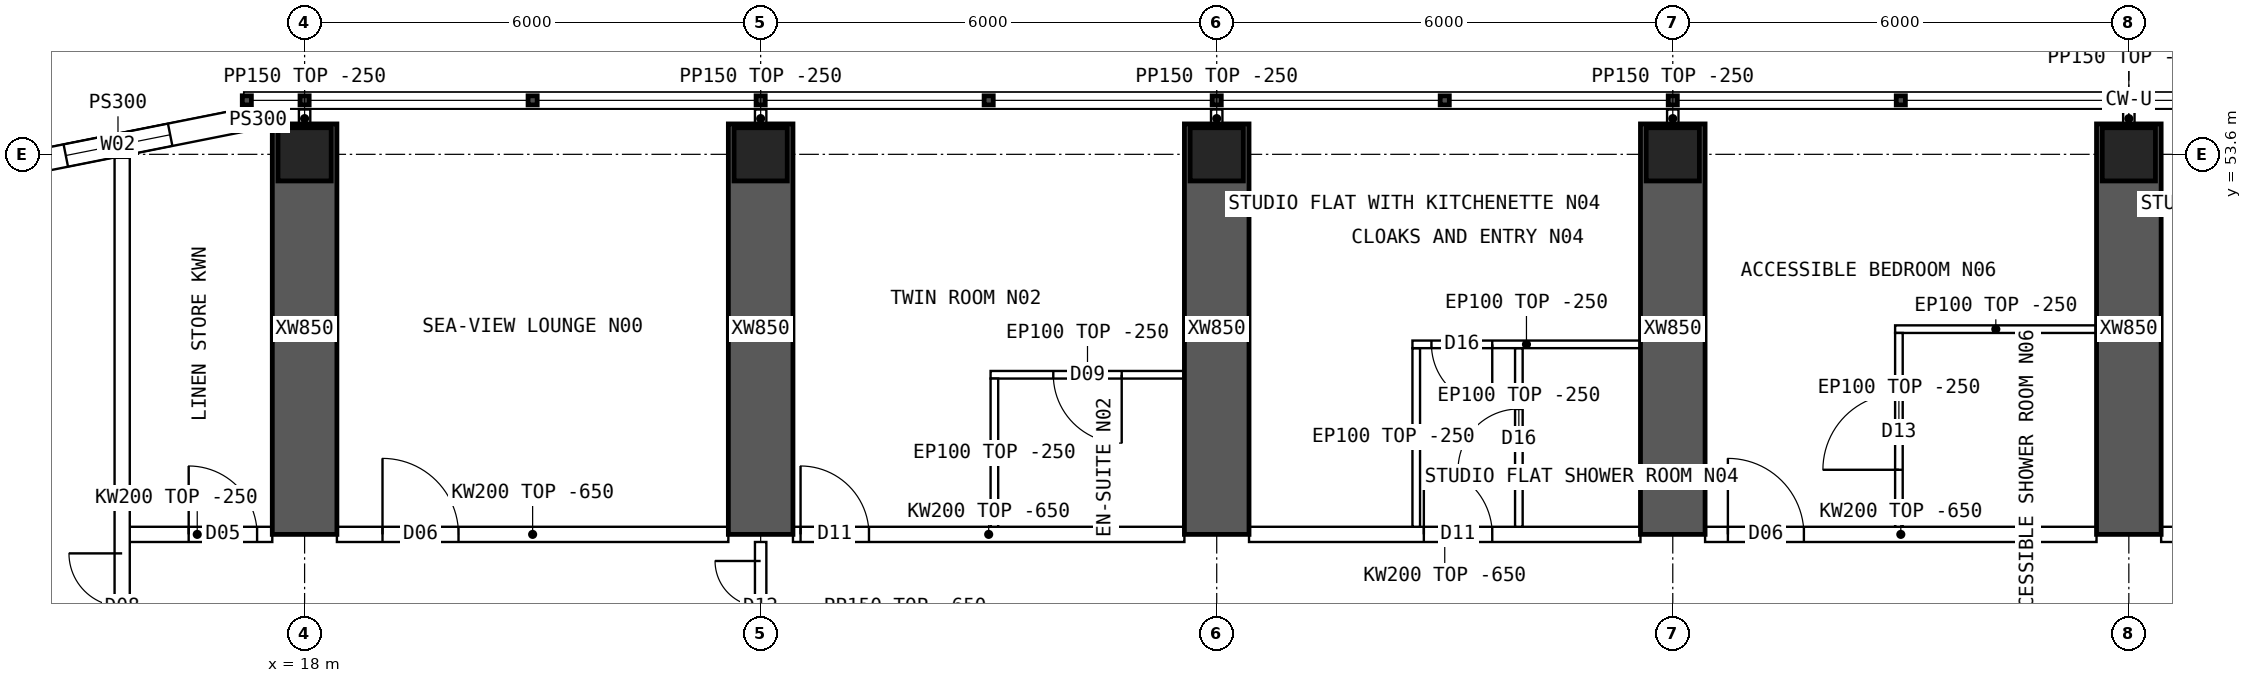
"""IFC4 building model, lengths in metres.
Left out: names, types, materials, properties, quantities, classifications, styles, units other than length and angle.
Written with IfcOpenShell. Run it as: python <this file> out.ifc"""

import sys

from ifc_helpers import new_model, si_unit, direction, frame, frame_2d, origin, origin_2d, place, context, subcontext, project, spatial, polyline, rectangle, hollow_rectangle, outline, extrude, element, fill, save


model = new_model("IFC4")
c1 = context("Model", 3, precision=1e-05, world=origin(), true_north=direction((0.0, 1.0)))
c2 = subcontext(c1, "Body", "Model", "MODEL_VIEW")
j1 = project(units=[si_unit("LENGTHUNIT", "METRE"), si_unit("PLANEANGLEUNIT", "RADIAN")], contexts=[c1])
p1 = place(None, origin())
s1 = spatial("IfcSite", under=j1, at=p1, CompositionType="ELEMENT")
p2 = place(p1, origin())
s2 = spatial("IfcBuilding", under=s1, at=p2, CompositionType="ELEMENT")
p3 = place(p2, frame((0.0, 0.0, 156.1)))
s3 = spatial("IfcBuildingStorey", under=s2, at=p3, CompositionType="ELEMENT", Elevation=156.1)
for number, where, z_axis, x_axis in (
    (1, (18.0, 53.6, 0.0), (0.0, 0.0, 1.0), (1.0, 0.0, 0.0)),
    (2, (24.0, 53.6, 0.0), (0.0, 0.0, 1.0), (1.0, 0.0, 0.0)),
    (3, (30.0, 53.6, 0.0), (0.0, 0.0, 1.0), (1.0, 0.0, 0.0)),
    (4, (36.0, 53.6, 0.0), (0.0, 0.0, 1.0), (1.0, 0.0, 0.0)),
    (5, (42.0, 53.6, 0.0), (0.0, 0.0, 1.0), (1.0, 0.0, 0.0)),
):
    element("IfcColumn", number, at=place(p3, frame(where, z_axis=z_axis, x_axis=x_axis)), inside=s3, PredefinedType="COLUMN", context=c2, shape_type="SweptSolid", body=[
        extrude(hollow_rectangle(XDim=0.7, YDim=0.7, WallThickness=0.07, at=origin_2d()), origin(), (0.0, 0.0, 1.0), 3.75),
    ])
for number, where, z_axis, x_axis in (
    (6, (18.0, 48.6, 0.0), (0.0, 0.0, 1.0), (0.0, 1.0, 0.0)),
    (7, (24.0, 48.6, 0.0), (0.0, 0.0, 1.0), (0.0, 1.0, 0.0)),
    (8, (30.0, 48.6, 0.0), (0.0, 0.0, 1.0), (0.0, 1.0, 0.0)),
    (9, (36.0, 48.6, 0.0), (0.0, 0.0, 1.0), (0.0, 1.0, 0.0)),
    (10, (42.0, 48.6, 0.0), (0.0, 0.0, 1.0), (0.0, 1.0, 0.0)),
):
    element("IfcWall", number, at=place(p3, frame(where, z_axis=z_axis, x_axis=x_axis)), inside=s3, PredefinedType="SHEAR", context=c2, shape_type="SweptSolid", body=[
        extrude(rectangle(XDim=5.4, YDim=0.85, at=frame_2d((2.7, 0.0))), origin(), (0.0, 0.0, 1.0), 3.75),
    ])
p4 = place(p3, frame((17.2, 54.05, 0.0), z_axis=(0.0, 0.0, 1.0), x_axis=(-0.98078325777, -0.195100490205, 0.0)))
e11 = element("IfcWall", 11, at=p4, inside=s3, PredefinedType="SOLIDWALL", context=c2, shape_type="SweptSolid", body=[
    extrude(outline(polyline([(-0.03, -0.15), (3.405, -0.15), (3.345, 0.15), (0.03, 0.15), (-0.03, -0.15)])), origin(), (0.0, 0.0, 1.0), 3.5),
])
p5 = place(p4, frame((0.988, 0.0, 0.9)))
e12 = element("IfcOpeningElement", 12, at=p5, cuts=e11, PredefinedType="OPENING", context=c2, shape_type="SweptSolid", body=[
    extrude(rectangle(XDim=1.4, YDim=1.8, at=frame_2d((0.7, 0.9))), frame((0.0, 0.16, 0.0), z_axis=(0.0, -1.0, 0.0), x_axis=(1.0, 0.0, 0.0)), (0.0, 0.0, 1.0), 0.32),
])
p6 = place(p3, frame((17.2, 54.05, 0.0), z_axis=(0.0, 0.0, 1.0), x_axis=(1.0, 0.0, 0.0)))
e13 = element("IfcWall", 13, at=p6, inside=s3, PredefinedType="SOLIDWALL", context=c2, shape_type="SweptSolid", body=[
    extrude(rectangle(XDim=0.375, YDim=0.3, at=frame_2d((0.188, 0.0))), origin(), (0.0, 0.0, 1.0), 3.5),
])
p7 = place(p3, frame((15.6, 48.6, 0.0), z_axis=(0.0, 0.0, 1.0), x_axis=(1.0, 0.0, 0.0)))
e14 = element("IfcWall", 14, at=p7, inside=s3, PredefinedType="SOLIDWALL", context=c2, shape_type="SweptSolid", body=[
    extrude(rectangle(XDim=1.975, YDim=0.2, at=frame_2d((0.987, 0.0))), origin(), (0.0, 0.0, 1.0), 3.5),
])
p8 = place(p7, frame((0.875, 0.0, 0.0)))
e15 = element("IfcOpeningElement", 15, at=p8, cuts=e14, PredefinedType="OPENING", context=c2, shape_type="SweptSolid", body=[
    extrude(rectangle(XDim=0.9, YDim=2.1, at=frame_2d((0.45, 1.05))), frame((0.0, 0.11, 0.0), z_axis=(0.0, -1.0, 0.0), x_axis=(1.0, 0.0, 0.0)), (0.0, 0.0, 1.0), 0.22),
])
p9 = place(p3, frame((18.425, 48.6, 0.0), z_axis=(0.0, 0.0, 1.0), x_axis=(1.0, 0.0, 0.0)))
e16 = element("IfcWall", 16, at=p9, inside=s3, PredefinedType="SOLIDWALL", context=c2, shape_type="SweptSolid", body=[
    extrude(outline(polyline([(0.0, 0.0), (5.15, 0.0), (5.15, 3.1), (0.0, 3.1), (0.0, 0.0)])), frame((0.0, 0.1, 0.0), z_axis=(0.0, -1.0, 0.0), x_axis=(1.0, 0.0, 0.0)), (0.0, 0.0, 1.0), 0.2),
])
p10 = place(p9, frame((0.6, 0.0, 0.0)))
e17 = element("IfcOpeningElement", 17, at=p10, cuts=e16, PredefinedType="OPENING", context=c2, shape_type="SweptSolid", body=[
    extrude(rectangle(XDim=1.0, YDim=2.1, at=frame_2d((0.5, 1.05))), frame((0.0, 0.11, 0.0), z_axis=(0.0, -1.0, 0.0), x_axis=(1.0, 0.0, 0.0)), (0.0, 0.0, 1.0), 0.22),
])
p11 = place(p3, frame((24.425, 48.6, 0.0), z_axis=(0.0, 0.0, 1.0), x_axis=(1.0, 0.0, 0.0)))
e18 = element("IfcWall", 18, at=p11, inside=s3, PredefinedType="SOLIDWALL", context=c2, shape_type="SweptSolid", body=[
    extrude(outline(polyline([(0.0, 0.0), (5.15, 0.0), (5.15, 3.1), (0.0, 3.1), (0.0, 0.0)])), frame((0.0, 0.1, 0.0), z_axis=(0.0, -1.0, 0.0), x_axis=(1.0, 0.0, 0.0)), (0.0, 0.0, 1.0), 0.2),
])
p12 = place(p11, frame((0.1, 0.0, 0.0)))
e19 = element("IfcOpeningElement", 19, at=p12, cuts=e18, PredefinedType="OPENING", context=c2, shape_type="SweptSolid", body=[
    extrude(rectangle(XDim=0.9, YDim=2.1, at=frame_2d((0.45, 1.05))), frame((0.0, 0.11, 0.0), z_axis=(0.0, -1.0, 0.0), x_axis=(1.0, 0.0, 0.0)), (0.0, 0.0, 1.0), 0.22),
])
p13 = place(p3, frame((30.425, 48.6, 0.0), z_axis=(0.0, 0.0, 1.0), x_axis=(1.0, 0.0, 0.0)))
e20 = element("IfcWall", 20, at=p13, inside=s3, PredefinedType="SOLIDWALL", context=c2, shape_type="SweptSolid", body=[
    extrude(outline(polyline([(0.0, 0.0), (5.15, 0.0), (5.15, 3.1), (0.0, 3.1), (0.0, 0.0)])), frame((0.0, 0.1, 0.0), z_axis=(0.0, -1.0, 0.0), x_axis=(1.0, 0.0, 0.0)), (0.0, 0.0, 1.0), 0.2),
])
p14 = place(p13, frame((2.3, 0.0, 0.0)))
e21 = element("IfcOpeningElement", 21, at=p14, cuts=e20, PredefinedType="OPENING", context=c2, shape_type="SweptSolid", body=[
    extrude(rectangle(XDim=0.9, YDim=2.1, at=frame_2d((0.45, 1.05))), frame((0.0, 0.11, 0.0), z_axis=(0.0, -1.0, 0.0), x_axis=(1.0, 0.0, 0.0)), (0.0, 0.0, 1.0), 0.22),
])
p15 = place(p3, frame((36.425, 48.6, 0.0), z_axis=(0.0, 0.0, 1.0), x_axis=(1.0, 0.0, 0.0)))
e22 = element("IfcWall", 22, at=p15, inside=s3, PredefinedType="SOLIDWALL", context=c2, shape_type="SweptSolid", body=[
    extrude(outline(polyline([(0.0, 0.0), (5.15, 0.0), (5.15, 3.1), (0.0, 3.1), (0.0, 0.0)])), frame((0.0, 0.1, 0.0), z_axis=(0.0, -1.0, 0.0), x_axis=(1.0, 0.0, 0.0)), (0.0, 0.0, 1.0), 0.2),
])
p16 = place(p15, frame((0.3, 0.0, 0.0)))
e23 = element("IfcOpeningElement", 23, at=p16, cuts=e22, PredefinedType="OPENING", context=c2, shape_type="SweptSolid", body=[
    extrude(rectangle(XDim=1.0, YDim=2.1, at=frame_2d((0.5, 1.05))), frame((0.0, 0.11, 0.0), z_axis=(0.0, -1.0, 0.0), x_axis=(1.0, 0.0, 0.0)), (0.0, 0.0, 1.0), 0.22),
])
p17 = place(p3, frame((42.425, 48.6, 0.0), z_axis=(0.0, 0.0, 1.0), x_axis=(1.0, 0.0, 0.0)))
e24 = element("IfcWall", 24, at=p17, inside=s3, PredefinedType="SOLIDWALL", context=c2, shape_type="SweptSolid", body=[
    extrude(outline(polyline([(0.0, 0.0), (5.15, 0.0), (5.15, 3.1), (0.0, 3.1), (0.0, 0.0)])), frame((0.0, 0.1, 0.0), z_axis=(0.0, -1.0, 0.0), x_axis=(1.0, 0.0, 0.0)), (0.0, 0.0, 1.0), 0.2),
])
p18 = place(p17, frame((2.3, 0.0, 0.0)))
e25 = element("IfcOpeningElement", 25, at=p18, cuts=e24, PredefinedType="OPENING", context=c2, shape_type="SweptSolid", body=[
    extrude(rectangle(XDim=0.9, YDim=2.1, at=frame_2d((0.45, 1.05))), frame((0.0, 0.11, 0.0), z_axis=(0.0, -1.0, 0.0), x_axis=(1.0, 0.0, 0.0)), (0.0, 0.0, 1.0), 0.22),
])
p19 = place(p3, frame((27.025, 50.7, 0.0), z_axis=(0.0, 0.0, 1.0), x_axis=(1.0, 0.0, 0.0)))
e26 = element("IfcWall", 26, at=p19, inside=s3, PredefinedType="PARTITIONING", context=c2, shape_type="SweptSolid", body=[
    extrude(rectangle(XDim=2.55, YDim=0.1, at=frame_2d((1.275, 0.0))), origin(), (0.0, 0.0, 1.0), 3.5),
])
p20 = place(p19, frame((0.825, 0.0, 0.0)))
e27 = element("IfcOpeningElement", 27, at=p20, cuts=e26, PredefinedType="OPENING", context=c2, shape_type="SweptSolid", body=[
    extrude(rectangle(XDim=0.9, YDim=2.1, at=frame_2d((0.45, 1.05))), frame((0.0, 0.06, 0.0), z_axis=(0.0, -1.0, 0.0), x_axis=(1.0, 0.0, 0.0)), (0.0, 0.0, 1.0), 0.12),
])
p21 = place(p3, frame((27.075, 50.65, 0.0), z_axis=(0.0, 0.0, 1.0), x_axis=(0.0, -1.0, 0.0)))
e28 = element("IfcWall", 28, at=p21, inside=s3, PredefinedType="PARTITIONING", context=c2, shape_type="SweptSolid", body=[
    extrude(outline(polyline([(0.0, 0.0), (1.95, 0.0), (1.95, 3.1), (1.902, 3.1), (1.9, 3.5), (0.0, 3.5), (0.0, 0.0)])), frame((0.0, 0.05, 0.0), z_axis=(0.0, -1.0, 0.0), x_axis=(1.0, 0.0, 0.0)), (0.0, 0.0, 1.0), 0.1),
])
p22 = place(p3, frame((32.575, 51.1, 0.0), z_axis=(0.0, 0.0, 1.0), x_axis=(1.0, 0.0, 0.0)))
e29 = element("IfcWall", 29, at=p22, inside=s3, PredefinedType="PARTITIONING", context=c2, shape_type="SweptSolid", body=[
    extrude(rectangle(XDim=3.0, YDim=0.1, at=frame_2d((1.5, 0.0))), origin(), (0.0, 0.0, 1.0), 3.5),
])
p23 = place(p22, frame((0.25, 0.0, 0.0)))
e30 = element("IfcOpeningElement", 30, at=p23, cuts=e29, PredefinedType="OPENING", context=c2, shape_type="SweptSolid", body=[
    extrude(rectangle(XDim=0.8, YDim=2.1, at=frame_2d((0.4, 1.05))), frame((0.0, 0.06, 0.0), z_axis=(0.0, -1.0, 0.0), x_axis=(1.0, 0.0, 0.0)), (0.0, 0.0, 1.0), 0.12),
])
p24 = place(p3, frame((32.625, 51.05, 0.0), z_axis=(0.0, 0.0, 1.0), x_axis=(0.0, -1.0, 0.0)))
e31 = element("IfcWall", 31, at=p24, inside=s3, PredefinedType="PARTITIONING", context=c2, shape_type="SweptSolid", body=[
    extrude(outline(polyline([(0.0, 0.0), (2.35, 0.0), (2.35, 3.1), (2.302, 3.1), (2.3, 3.5), (0.0, 3.5), (0.0, 0.0)])), frame((0.0, 0.05, 0.0), z_axis=(0.0, -1.0, 0.0), x_axis=(1.0, 0.0, 0.0)), (0.0, 0.0, 1.0), 0.1),
])
p25 = place(p3, frame((33.975, 51.05, 0.0), z_axis=(0.0, 0.0, 1.0), x_axis=(0.0, -1.0, 0.0)))
e32 = element("IfcWall", 32, at=p25, inside=s3, PredefinedType="PARTITIONING", context=c2, shape_type="SweptSolid", body=[
    extrude(outline(polyline([(0.0, 0.0), (2.35, 0.0), (2.35, 3.1), (2.302, 3.1), (2.3, 3.5), (0.0, 3.5), (0.0, 0.0)])), frame((0.0, 0.05, 0.0), z_axis=(0.0, -1.0, 0.0), x_axis=(1.0, 0.0, 0.0)), (0.0, 0.0, 1.0), 0.1),
])
p26 = place(p25, frame((0.8, 0.0, 0.0)))
e33 = element("IfcOpeningElement", 33, at=p26, cuts=e32, PredefinedType="OPENING", context=c2, shape_type="SweptSolid", body=[
    extrude(rectangle(XDim=0.8, YDim=2.1, at=frame_2d((0.4, 1.05))), frame((0.0, 0.06, 0.0), z_axis=(0.0, -1.0, 0.0), x_axis=(1.0, 0.0, 0.0)), (0.0, 0.0, 1.0), 0.12),
])
p27 = place(p3, frame((38.925, 51.3, 0.0), z_axis=(0.0, 0.0, 1.0), x_axis=(1.0, 0.0, 0.0)))
e34 = element("IfcWall", 34, at=p27, inside=s3, PredefinedType="PARTITIONING", context=c2, shape_type="SweptSolid", body=[
    extrude(rectangle(XDim=2.65, YDim=0.1, at=frame_2d((1.325, 0.0))), origin(), (0.0, 0.0, 1.0), 3.5),
])
p28 = place(p3, frame((38.975, 51.25, 0.0), z_axis=(0.0, 0.0, 1.0), x_axis=(0.0, -1.0, 0.0)))
e35 = element("IfcWall", 35, at=p28, inside=s3, PredefinedType="PARTITIONING", context=c2, shape_type="SweptSolid", body=[
    extrude(outline(polyline([(0.0, 0.0), (2.55, 0.0), (2.55, 3.1), (2.502, 3.1), (2.5, 3.5), (0.0, 3.5), (0.0, 0.0)])), frame((0.0, 0.05, 0.0), z_axis=(0.0, -1.0, 0.0), x_axis=(1.0, 0.0, 0.0)), (0.0, 0.0, 1.0), 0.1),
])
p29 = place(p28, frame((0.8, 0.0, 0.0)))
e36 = element("IfcOpeningElement", 36, at=p29, cuts=e35, PredefinedType="OPENING", context=c2, shape_type="SweptSolid", body=[
    extrude(rectangle(XDim=1.0, YDim=2.1, at=frame_2d((0.5, 1.05))), frame((0.0, 0.06, 0.0), z_axis=(0.0, -1.0, 0.0), x_axis=(1.0, 0.0, 0.0)), (0.0, 0.0, 1.0), 0.12),
])
p30 = place(p3, frame((24.0, 46.8, 0.0), z_axis=(0.0, 0.0, 1.0), x_axis=(0.0, 1.0, 0.0)))
e37 = element("IfcWall", 37, at=p30, inside=s3, PredefinedType="PARTITIONING", context=c2, shape_type="SweptSolid", body=[
    extrude(outline(polyline([(0.0, 0.0), (1.7, 0.0), (1.7, 3.1), (0.0, 3.1), (0.0, 0.0)])), frame((0.0, 0.075, 0.0), z_axis=(0.0, -1.0, 0.0), x_axis=(1.0, 0.0, 0.0)), (0.0, 0.0, 1.0), 0.15),
])
p31 = place(p30, frame((0.25, 0.0, 0.0)))
e38 = element("IfcOpeningElement", 38, at=p31, cuts=e37, PredefinedType="OPENING", context=c2, shape_type="SweptSolid", body=[
    extrude(rectangle(XDim=1.2, YDim=2.1, at=frame_2d((0.6, 1.05))), frame((0.0, 0.085, 0.0), z_axis=(0.0, -1.0, 0.0), x_axis=(1.0, 0.0, 0.0)), (0.0, 0.0, 1.0), 0.17),
])
p32 = place(p3, frame((15.6, 10.446, 0.0), z_axis=(0.0, 0.0, 1.0), x_axis=(0.0, 1.0, 0.0)))
e39 = element("IfcWall", 39, at=p32, inside=s3, PredefinedType="SOLIDWALL", context=c2, shape_type="SweptSolid", body=[
    extrude(rectangle(XDim=43.107, YDim=0.2, at=frame_2d((21.554, 0.0))), origin(), (0.0, 0.0, 1.0), 3.5),
])
p33 = place(p32, frame((13.914, 0.0, 0.0)))
e40 = element("IfcOpeningElement", 40, at=p33, cuts=e39, PredefinedType="OPENING", context=c2, shape_type="SweptSolid", body=[
    extrude(rectangle(XDim=1.2, YDim=2.1, at=frame_2d((0.6, 1.05))), frame((0.0, 0.11, 0.0), z_axis=(0.0, -1.0, 0.0), x_axis=(1.0, 0.0, 0.0)), (0.0, 0.0, 1.0), 0.22),
])
p34 = place(p32, frame((27.994, 0.0, 0.0)))
e41 = element("IfcOpeningElement", 41, at=p34, cuts=e39, PredefinedType="OPENING", context=c2, shape_type="SweptSolid", body=[
    extrude(rectangle(XDim=1.2, YDim=2.1, at=frame_2d((0.6, 1.05))), frame((0.0, 0.11, 0.0), z_axis=(0.0, -1.0, 0.0), x_axis=(1.0, 0.0, 0.0)), (0.0, 0.0, 1.0), 0.22),
])
p35 = place(p32, frame((5.104, 0.0, 0.0)))
e42 = element("IfcOpeningElement", 42, at=p35, cuts=e39, PredefinedType="OPENING", context=c2, shape_type="SweptSolid", body=[
    extrude(rectangle(XDim=1.4, YDim=2.1, at=frame_2d((0.7, 1.05))), frame((0.0, 0.11, 0.0), z_axis=(0.0, -1.0, 0.0), x_axis=(1.0, 0.0, 0.0)), (0.0, 0.0, 1.0), 0.22),
])
p36 = place(p32, frame((36.504, 0.0, 0.0)))
e43 = element("IfcOpeningElement", 43, at=p36, cuts=e39, PredefinedType="OPENING", context=c2, shape_type="SweptSolid", body=[
    extrude(rectangle(XDim=1.4, YDim=2.1, at=frame_2d((0.7, 1.05))), frame((0.0, 0.11, 0.0), z_axis=(0.0, -1.0, 0.0), x_axis=(1.0, 0.0, 0.0)), (0.0, 0.0, 1.0), 0.22),
])
for number, where, z_axis, x_axis in (
    (44, (18.0, 53.95, 0.0), (0.0, 0.0, 1.0), (0.0, 1.0, 0.0)),
    (45, (24.0, 53.95, 0.0), (0.0, 0.0, 1.0), (0.0, 1.0, 0.0)),
    (46, (30.0, 53.95, 0.0), (0.0, 0.0, 1.0), (0.0, 1.0, 0.0)),
    (47, (36.0, 53.95, 0.0), (0.0, 0.0, 1.0), (0.0, 1.0, 0.0)),
    (48, (42.0, 53.95, 0.0), (0.0, 0.0, 1.0), (0.0, 1.0, 0.0)),
):
    element("IfcWall", number, at=place(p3, frame(where, z_axis=z_axis, x_axis=x_axis)), inside=s3, PredefinedType="PARTITIONING", context=c2, shape_type="SweptSolid", body=[
        extrude(rectangle(XDim=0.24, YDim=0.15, at=frame_2d((0.12, 0.0))), origin(), (0.0, 0.0, 1.0), 3.5),
    ])
p37 = place(p5, origin())
e49 = element("IfcWindow", 49, at=p37, inside=s3, PartitioningType="SINGLE_PANEL", PredefinedType="WINDOW", context=c2, shape_type="SweptSolid", body=[
    extrude(rectangle(XDim=1.4, YDim=1.8, at=frame_2d((0.7, 0.9))), frame((0.0, 0.03, 0.0), z_axis=(0.0, -1.0, 0.0), x_axis=(1.0, 0.0, 0.0)), (0.0, 0.0, 1.0), 0.06),
])
fill(e12, e49)
p38 = place(p10, origin())
e50 = element("IfcDoor", 50, at=p38, inside=s3, OperationType="SINGLE_SWING_LEFT", PredefinedType="DOOR", context=c2, shape_type="SweptSolid", body=[
    extrude(rectangle(XDim=1.0, YDim=2.1, at=frame_2d((0.5, 1.05))), frame((0.0, 0.025, 0.0), z_axis=(0.0, -1.0, 0.0), x_axis=(1.0, 0.0, 0.0)), (0.0, 0.0, 1.0), 0.05),
])
fill(e17, e50)
p39 = place(p20, origin())
e51 = element("IfcDoor", 51, at=p39, inside=s3, OperationType="SINGLE_SWING_RIGHT", PredefinedType="DOOR", context=c2, shape_type="SweptSolid", body=[
    extrude(rectangle(XDim=0.9, YDim=2.1, at=frame_2d((0.45, 1.05))), frame((0.0, 0.025, 0.0), z_axis=(0.0, -1.0, 0.0), x_axis=(1.0, 0.0, 0.0)), (0.0, 0.0, 1.0), 0.05),
])
fill(e27, e51)
p40 = place(p12, origin())
e52 = element("IfcDoor", 52, at=p40, inside=s3, OperationType="SINGLE_SWING_LEFT", PredefinedType="DOOR", context=c2, shape_type="SweptSolid", body=[
    extrude(rectangle(XDim=0.9, YDim=2.1, at=frame_2d((0.45, 1.05))), frame((0.0, 0.025, 0.0), z_axis=(0.0, -1.0, 0.0), x_axis=(1.0, 0.0, 0.0)), (0.0, 0.0, 1.0), 0.05),
])
fill(e19, e52)
p41 = place(p23, origin())
e53 = element("IfcDoor", 53, at=p41, inside=s3, OperationType="SINGLE_SWING_RIGHT", PredefinedType="DOOR", context=c2, shape_type="SweptSolid", body=[
    extrude(rectangle(XDim=0.8, YDim=2.1, at=frame_2d((0.4, 1.05))), frame((0.0, 0.025, 0.0), z_axis=(0.0, -1.0, 0.0), x_axis=(1.0, 0.0, 0.0)), (0.0, 0.0, 1.0), 0.05),
])
fill(e30, e53)
p42 = place(p26, origin())
e54 = element("IfcDoor", 54, at=p42, inside=s3, OperationType="SINGLE_SWING_RIGHT", PredefinedType="DOOR", context=c2, shape_type="SweptSolid", body=[
    extrude(rectangle(XDim=0.8, YDim=2.1, at=frame_2d((0.4, 1.05))), frame((0.0, 0.025, 0.0), z_axis=(0.0, -1.0, 0.0), x_axis=(1.0, 0.0, 0.0)), (0.0, 0.0, 1.0), 0.05),
])
fill(e33, e54)
p43 = place(p14, origin())
e55 = element("IfcDoor", 55, at=p43, inside=s3, OperationType="SINGLE_SWING_LEFT", PredefinedType="DOOR", context=c2, shape_type="SweptSolid", body=[
    extrude(rectangle(XDim=0.9, YDim=2.1, at=frame_2d((0.45, 1.05))), frame((0.0, 0.025, 0.0), z_axis=(0.0, -1.0, 0.0), x_axis=(1.0, 0.0, 0.0)), (0.0, 0.0, 1.0), 0.05),
])
fill(e21, e55)
p44 = place(p29, origin())
e56 = element("IfcDoor", 56, at=p44, inside=s3, OperationType="SINGLE_SWING_RIGHT", PredefinedType="DOOR", context=c2, shape_type="SweptSolid", body=[
    extrude(rectangle(XDim=1.0, YDim=2.1, at=frame_2d((0.5, 1.05))), frame((0.0, 0.025, 0.0), z_axis=(0.0, -1.0, 0.0), x_axis=(1.0, 0.0, 0.0)), (0.0, 0.0, 1.0), 0.05),
])
fill(e36, e56)
p45 = place(p16, origin())
e57 = element("IfcDoor", 57, at=p45, inside=s3, OperationType="SINGLE_SWING_LEFT", PredefinedType="DOOR", context=c2, shape_type="SweptSolid", body=[
    extrude(rectangle(XDim=1.0, YDim=2.1, at=frame_2d((0.5, 1.05))), frame((0.0, 0.025, 0.0), z_axis=(0.0, -1.0, 0.0), x_axis=(1.0, 0.0, 0.0)), (0.0, 0.0, 1.0), 0.05),
])
fill(e23, e57)
p46 = place(p31, origin())
e58 = element("IfcDoor", 58, at=p46, inside=s3, OperationType="DOUBLE_DOOR_SINGLE_SWING", PredefinedType="DOOR", context=c2, shape_type="SweptSolid", body=[
    extrude(rectangle(XDim=1.2, YDim=2.1, at=frame_2d((0.6, 1.05))), frame((0.0, 0.025, 0.0), z_axis=(0.0, -1.0, 0.0), x_axis=(1.0, 0.0, 0.0)), (0.0, 0.0, 1.0), 0.05),
])
fill(e38, e58)
p47 = place(p36, origin())
e59 = element("IfcDoor", 59, at=p47, inside=s3, OperationType="DOUBLE_DOOR_SINGLE_SWING", PredefinedType="DOOR", context=c2, shape_type="SweptSolid", body=[
    extrude(rectangle(XDim=1.4, YDim=2.1, at=frame_2d((0.7, 1.05))), frame((0.0, 0.025, 0.0), z_axis=(0.0, -1.0, 0.0), x_axis=(1.0, 0.0, 0.0)), (0.0, 0.0, 1.0), 0.05),
])
fill(e43, e59)
p48 = place(p8, origin())
e60 = element("IfcDoor", 60, at=p48, inside=s3, OperationType="SINGLE_SWING_LEFT", PredefinedType="DOOR", context=c2, shape_type="SweptSolid", body=[
    extrude(rectangle(XDim=0.9, YDim=2.1, at=frame_2d((0.45, 1.05))), frame((0.0, 0.025, 0.0), z_axis=(0.0, -1.0, 0.0), x_axis=(1.0, 0.0, 0.0)), (0.0, 0.0, 1.0), 0.05),
])
fill(e15, e60)
save(model, sys.argv[1])
